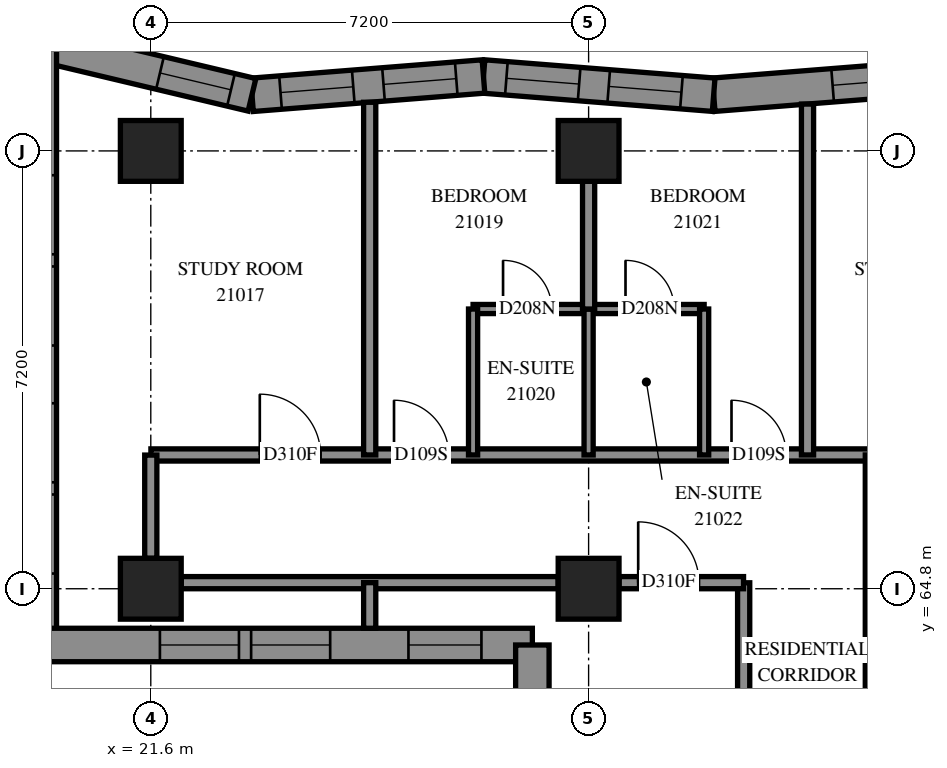
"""IFC4 building model, lengths in metres.
Left out: names, types, materials, properties, quantities, classifications, styles, units other than length and angle.
Written with IfcOpenShell. Run it as: python <this file> out.ifc"""

import sys

from ifc_helpers import new_model, si_unit, direction, frame, frame_2d, origin, origin_2d, place, context, subcontext, project, spatial, polyline, rectangle, outline, extrude, element, fill, save


model = new_model("IFC4")
c1 = context("Model", 3, precision=1e-05, world=origin(), true_north=direction((0.0, 1.0)))
c2 = subcontext(c1, "Body", "Model", "MODEL_VIEW")
j1 = project(units=[si_unit("LENGTHUNIT", "METRE"), si_unit("PLANEANGLEUNIT", "RADIAN")], contexts=[c1])
p1 = place(None, origin())
s1 = spatial("IfcSite", under=j1, at=p1, CompositionType="ELEMENT")
p2 = place(p1, origin())
s2 = spatial("IfcBuilding", under=s1, at=p2, CompositionType="ELEMENT")
p3 = place(p2, frame((0.0, 0.0, 81.2)))
s3 = spatial("IfcBuildingStorey", under=s2, at=p3, CompositionType="ELEMENT", Elevation=81.2)
for number, where, z_axis, x_axis in (
    (1, (21.6, 64.8, 0.0), (0.0, 0.0, 1.0), (1.0, 0.0, 0.0)),
    (2, (21.6, 72.0, 0.0), (0.0, 0.0, 1.0), (1.0, 0.0, 0.0)),
    (3, (28.8, 64.8, 0.0), (0.0, 0.0, 1.0), (1.0, 0.0, 0.0)),
    (4, (28.8, 72.0, 0.0), (0.0, 0.0, 1.0), (1.0, 0.0, 0.0)),
):
    element("IfcColumn", number, at=place(p3, frame(where, z_axis=z_axis, x_axis=x_axis)), inside=s3, PredefinedType="COLUMN", context=c2, shape_type="SweptSolid", body=[
        extrude(rectangle(XDim=1.0, YDim=1.0, at=origin_2d()), origin(), (0.0, 0.0, 1.0), 3.1),
    ])
p4 = place(p3, frame((34.642, 73.224, 0.0), z_axis=(0.0, 0.0, 1.0), x_axis=(-0.9968746163, -0.078999996, 0.0)))
e5 = element("IfcWall", 5, at=p4, inside=s3, PredefinedType="SOLIDWALL", context=c2, shape_type="SweptSolid", body=[
    extrude(outline(polyline([(-0.022, -0.275), (3.776, -0.275), (3.819, 0.275), (0.022, 0.275), (-0.022, -0.275)])), origin(), (0.0, 0.0, 1.0), 3.1),
])
p5 = place(p4, frame((0.636, 0.0, 0.5)))
e6 = element("IfcOpeningElement", 6, at=p5, cuts=e5, PredefinedType="OPENING", context=c2, shape_type="SweptSolid", body=[
    extrude(rectangle(XDim=1.2, YDim=2.45, at=frame_2d((0.6, 1.225))), frame((0.0, 0.285, 0.0), z_axis=(0.0, -1.0, 0.0), x_axis=(1.0, 0.0, 0.0)), (0.0, 0.0, 1.0), 0.57),
])
p6 = place(p3, frame((30.857, 72.924, 0.0), z_axis=(0.0, 0.0, 1.0), x_axis=(-0.9968747806, 0.0789979222, 0.0)))
e7 = element("IfcWall", 7, at=p6, inside=s3, PredefinedType="SOLIDWALL", context=c2, shape_type="SweptSolid", body=[
    extrude(outline(polyline([(0.022, -0.275), (3.819, -0.275), (3.776, 0.275), (-0.022, 0.275), (0.022, -0.275)])), origin(), (0.0, 0.0, 1.0), 3.1),
])
p7 = place(p6, frame((0.532, 0.0, 0.5)))
e8 = element("IfcOpeningElement", 8, at=p7, cuts=e7, PredefinedType="OPENING", context=c2, shape_type="SweptSolid", body=[
    extrude(rectangle(XDim=1.2, YDim=2.45, at=frame_2d((0.6, 1.225))), frame((0.0, 0.285, 0.0), z_axis=(0.0, -1.0, 0.0), x_axis=(1.0, 0.0, 0.0)), (0.0, 0.0, 1.0), 0.57),
])
p8 = place(p6, frame((2.22, 0.0, 0.5)))
e9 = element("IfcOpeningElement", 9, at=p8, cuts=e7, PredefinedType="OPENING", context=c2, shape_type="SweptSolid", body=[
    extrude(rectangle(XDim=1.2, YDim=2.45, at=frame_2d((0.6, 1.225))), frame((0.0, 0.285, 0.0), z_axis=(0.0, -1.0, 0.0), x_axis=(1.0, 0.0, 0.0)), (0.0, 0.0, 1.0), 0.57),
])
p9 = place(p3, frame((27.071, 73.224, 0.0), z_axis=(0.0, 0.0, 1.0), x_axis=(-0.9968745318, -0.0790010628, 0.0)))
e10 = element("IfcWall", 10, at=p9, inside=s3, PredefinedType="SOLIDWALL", context=c2, shape_type="SweptSolid", body=[
    extrude(outline(polyline([(-0.022, -0.275), (3.776, -0.275), (3.862, 0.275), (0.022, 0.275), (-0.022, -0.275)])), origin(), (0.0, 0.0, 1.0), 3.1),
])
p10 = place(p9, frame((0.449, 0.0, 0.5)))
e11 = element("IfcOpeningElement", 11, at=p10, cuts=e10, PredefinedType="OPENING", context=c2, shape_type="SweptSolid", body=[
    extrude(rectangle(XDim=1.2, YDim=2.45, at=frame_2d((0.6, 1.225))), frame((0.0, 0.285, 0.0), z_axis=(0.0, -1.0, 0.0), x_axis=(1.0, 0.0, 0.0)), (0.0, 0.0, 1.0), 0.57),
])
p11 = place(p9, frame((2.148, 0.0, 0.5)))
e12 = element("IfcOpeningElement", 12, at=p11, cuts=e10, PredefinedType="OPENING", context=c2, shape_type="SweptSolid", body=[
    extrude(rectangle(XDim=1.2, YDim=2.45, at=frame_2d((0.6, 1.225))), frame((0.0, 0.285, 0.0), z_axis=(0.0, -1.0, 0.0), x_axis=(1.0, 0.0, 0.0)), (0.0, 0.0, 1.0), 0.57),
])
p12 = place(p3, frame((23.264, 72.922, 0.0), z_axis=(0.0, 0.0, 1.0), x_axis=(-0.9728791637, 0.231313927, 0.0)))
e13 = element("IfcWall", 13, at=p12, inside=s3, PredefinedType="SOLIDWALL", context=c2, shape_type="SweptSolid", body=[
    extrude(outline(polyline([(0.043, -0.275), (3.934, -0.275), (3.238, 0.275), (-0.043, 0.275), (0.043, -0.275)])), origin(), (0.0, 0.0, 1.0), 3.1),
])
p13 = place(p12, frame((0.355, 0.0, 0.5)))
e14 = element("IfcOpeningElement", 14, at=p13, cuts=e13, PredefinedType="OPENING", context=c2, shape_type="SweptSolid", body=[
    extrude(rectangle(XDim=1.2, YDim=2.45, at=frame_2d((0.6, 1.225))), frame((0.0, 0.285, 0.0), z_axis=(0.0, -1.0, 0.0), x_axis=(1.0, 0.0, 0.0)), (0.0, 0.0, 1.0), 0.57),
])
p14 = place(p3, frame((19.775, 73.752, 0.0), z_axis=(0.0, 0.0, 1.0), x_axis=(0.0, -1.0, 0.0)))
e15 = element("IfcWall", 15, at=p14, inside=s3, PredefinedType="SOLIDWALL", context=c2, shape_type="SweptSolid", body=[
    extrude(outline(polyline([(-0.348, -0.275), (10.152, -0.275), (9.602, 0.275), (0.348, 0.275), (-0.348, -0.275)])), origin(), (0.0, 0.0, 1.0), 3.1),
])
p15 = place(p14, frame((2.152, 0.0, 0.5)))
e16 = element("IfcOpeningElement", 16, at=p15, cuts=e15, PredefinedType="OPENING", context=c2, shape_type="SweptSolid", body=[
    extrude(rectangle(XDim=1.3, YDim=2.45, at=frame_2d((0.65, 1.225))), frame((0.0, 0.285, 0.0), z_axis=(0.0, -1.0, 0.0), x_axis=(1.0, 0.0, 0.0)), (0.0, 0.0, 1.0), 0.57),
])
p16 = place(p14, frame((3.652, 0.0, 0.5)))
e17 = element("IfcOpeningElement", 17, at=p16, cuts=e15, PredefinedType="OPENING", context=c2, shape_type="SweptSolid", body=[
    extrude(rectangle(XDim=1.3, YDim=2.45, at=frame_2d((0.65, 1.225))), frame((0.0, 0.285, 0.0), z_axis=(0.0, -1.0, 0.0), x_axis=(1.0, 0.0, 0.0)), (0.0, 0.0, 1.0), 0.57),
])
p17 = place(p14, frame((5.902, 0.0, 0.5)))
e18 = element("IfcOpeningElement", 18, at=p17, cuts=e15, PredefinedType="OPENING", context=c2, shape_type="SweptSolid", body=[
    extrude(rectangle(XDim=1.3, YDim=2.45, at=frame_2d((0.65, 1.225))), frame((0.0, 0.285, 0.0), z_axis=(0.0, -1.0, 0.0), x_axis=(1.0, 0.0, 0.0)), (0.0, 0.0, 1.0), 0.57),
])
p18 = place(p14, frame((7.402, 0.0, 0.5)))
e19 = element("IfcOpeningElement", 19, at=p18, cuts=e15, PredefinedType="OPENING", context=c2, shape_type="SweptSolid", body=[
    extrude(rectangle(XDim=1.3, YDim=2.45, at=frame_2d((0.65, 1.225))), frame((0.0, 0.285, 0.0), z_axis=(0.0, -1.0, 0.0), x_axis=(1.0, 0.0, 0.0)), (0.0, 0.0, 1.0), 0.57),
])
p19 = place(p3, frame((19.775, 63.875, 0.0), z_axis=(0.0, 0.0, 1.0), x_axis=(1.0, 0.0, 0.0)))
e20 = element("IfcWall", 20, at=p19, inside=s3, PredefinedType="SOLIDWALL", context=c2, shape_type="SweptSolid", body=[
    extrude(outline(polyline([(-0.275, -0.275), (7.825, -0.275), (8.375, 0.275), (0.275, 0.275), (-0.275, -0.275)])), origin(), (0.0, 0.0, 1.0), 3.1),
])
p20 = place(p19, frame((1.975, 0.0, 0.5)))
e21 = element("IfcOpeningElement", 21, at=p20, cuts=e20, PredefinedType="OPENING", context=c2, shape_type="SweptSolid", body=[
    extrude(rectangle(XDim=1.3, YDim=2.45, at=frame_2d((0.65, 1.225))), frame((0.0, 0.285, 0.0), z_axis=(0.0, -1.0, 0.0), x_axis=(1.0, 0.0, 0.0)), (0.0, 0.0, 1.0), 0.57),
])
p21 = place(p19, frame((3.475, 0.0, 0.5)))
e22 = element("IfcOpeningElement", 22, at=p21, cuts=e20, PredefinedType="OPENING", context=c2, shape_type="SweptSolid", body=[
    extrude(rectangle(XDim=1.3, YDim=2.45, at=frame_2d((0.65, 1.225))), frame((0.0, 0.285, 0.0), z_axis=(0.0, -1.0, 0.0), x_axis=(1.0, 0.0, 0.0)), (0.0, 0.0, 1.0), 0.57),
])
p22 = place(p19, frame((6.062, 0.0, 0.5)))
e23 = element("IfcOpeningElement", 23, at=p22, cuts=e20, PredefinedType="OPENING", context=c2, shape_type="SweptSolid", body=[
    extrude(rectangle(XDim=1.2, YDim=2.45, at=frame_2d((0.6, 1.225))), frame((0.0, 0.285, 0.0), z_axis=(0.0, -1.0, 0.0), x_axis=(1.0, 0.0, 0.0)), (0.0, 0.0, 1.0), 0.57),
])
p23 = place(p3, frame((27.875, 63.875, 0.0), z_axis=(0.0, 0.0, 1.0), x_axis=(0.0, -1.0, 0.0)))
e24 = element("IfcWall", 24, at=p23, inside=s3, PredefinedType="SOLIDWALL", context=c2, shape_type="SweptSolid", body=[
    extrude(outline(polyline([(0.275, -0.275), (8.375, -0.275), (7.825, 0.275), (-0.275, 0.275), (0.275, -0.275)])), origin(), (0.0, 0.0, 1.0), 3.1),
])
p24 = place(p23, frame((4.825, 0.0, 0.5)))
e25 = element("IfcOpeningElement", 25, at=p24, cuts=e24, PredefinedType="OPENING", context=c2, shape_type="SweptSolid", body=[
    extrude(rectangle(XDim=1.3, YDim=2.45, at=frame_2d((0.65, 1.225))), frame((0.0, 0.285, 0.0), z_axis=(0.0, -1.0, 0.0), x_axis=(1.0, 0.0, 0.0)), (0.0, 0.0, 1.0), 0.57),
])
p25 = place(p23, frame((1.738, 0.0, 0.5)))
e26 = element("IfcOpeningElement", 26, at=p25, cuts=e24, PredefinedType="OPENING", context=c2, shape_type="SweptSolid", body=[
    extrude(rectangle(XDim=1.2, YDim=2.45, at=frame_2d((0.6, 1.225))), frame((0.0, 0.285, 0.0), z_axis=(0.0, -1.0, 0.0), x_axis=(1.0, 0.0, 0.0)), (0.0, 0.0, 1.0), 0.57),
])
p26 = place(p23, frame((3.9, 0.0, 0.45)))
e27 = element("IfcOpeningElement", 27, at=p26, cuts=e24, PredefinedType="OPENING", context=c2, shape_type="SweptSolid", body=[
    extrude(rectangle(XDim=0.8, YDim=2.5, at=frame_2d((0.4, 1.25))), frame((0.0, 0.285, 0.0), z_axis=(0.0, -1.0, 0.0), x_axis=(1.0, 0.0, 0.0)), (0.0, 0.0, 1.0), 0.57),
])
p27 = place(p3, frame((21.602, 67.0, 0.0), z_axis=(0.0, 0.0, 1.0), x_axis=(1.0, 0.0, 0.0)))
e28 = element("IfcWall", 28, at=p27, inside=s3, PredefinedType="PARTITIONING", context=c2, shape_type="SweptSolid", body=[
    extrude(rectangle(XDim=11.848, YDim=0.2, at=frame_2d((5.924, 0.0))), origin(), (0.0, 0.0, 1.0), 3.1),
])
p28 = place(p27, frame((1.791, 0.0, 0.0)))
e29 = element("IfcOpeningElement", 29, at=p28, cuts=e28, PredefinedType="OPENING", context=c2, shape_type="SweptSolid", body=[
    extrude(rectangle(XDim=1.0, YDim=2.1, at=frame_2d((0.5, 1.05))), frame((0.0, 0.11, 0.0), z_axis=(0.0, -1.0, 0.0), x_axis=(1.0, 0.0, 0.0)), (0.0, 0.0, 1.0), 0.22),
])
p29 = place(p27, frame((3.998, 0.0, 0.0)))
e30 = element("IfcOpeningElement", 30, at=p29, cuts=e28, PredefinedType="OPENING", context=c2, shape_type="SweptSolid", body=[
    extrude(rectangle(XDim=0.9, YDim=2.1, at=frame_2d((0.45, 1.05))), frame((0.0, 0.11, 0.0), z_axis=(0.0, -1.0, 0.0), x_axis=(1.0, 0.0, 0.0)), (0.0, 0.0, 1.0), 0.22),
])
p30 = place(p27, frame((9.548, 0.0, 0.0)))
e31 = element("IfcOpeningElement", 31, at=p30, cuts=e28, PredefinedType="OPENING", context=c2, shape_type="SweptSolid", body=[
    extrude(rectangle(XDim=0.9, YDim=2.1, at=frame_2d((0.45, 1.05))), frame((0.0, 0.11, 0.0), z_axis=(0.0, -1.0, 0.0), x_axis=(1.0, 0.0, 0.0)), (0.0, 0.0, 1.0), 0.22),
])
p31 = place(p3, frame((22.1, 64.9, 0.0), z_axis=(0.0, 0.0, 1.0), x_axis=(1.0, 0.0, 0.0)))
e32 = element("IfcWall", 32, at=p31, inside=s3, PredefinedType="PARTITIONING", context=c2, shape_type="SweptSolid", body=[
    extrude(rectangle(XDim=6.2, YDim=0.2, at=frame_2d((3.1, 0.0))), origin(), (0.0, 0.0, 1.0), 2.6),
])
p32 = place(p3, frame((25.2, 67.0, 0.0), z_axis=(0.0, 0.0, 1.0), x_axis=(0.0, 1.0, 0.0)))
e33 = element("IfcWall", 33, at=p32, inside=s3, PredefinedType="PARTITIONING", context=c2, shape_type="SweptSolid", body=[
    extrude(rectangle(XDim=5.8, YDim=0.2, at=frame_2d((2.9, 0.0))), origin(), (0.0, 0.0, 1.0), 3.1),
])
p33 = place(p3, frame((32.4, 67.0, 0.0), z_axis=(0.0, 0.0, 1.0), x_axis=(0.0, 1.0, 0.0)))
e34 = element("IfcWall", 34, at=p33, inside=s3, PredefinedType="PARTITIONING", context=c2, shape_type="SweptSolid", body=[
    extrude(rectangle(XDim=5.771, YDim=0.2, at=frame_2d((2.885, 0.0))), origin(), (0.0, 0.0, 1.0), 3.1),
])
p34 = place(p3, frame((33.45, 62.252, 0.0), z_axis=(0.0, 0.0, 1.0), x_axis=(0.0, 1.0, 0.0)))
e35 = element("IfcWall", 35, at=p34, inside=s3, PredefinedType="PARTITIONING", context=c2, shape_type="SweptSolid", body=[
    extrude(rectangle(XDim=4.748, YDim=0.2, at=frame_2d((2.374, 0.0))), origin(), (0.0, 0.0, 1.0), 3.1),
])
p35 = place(p3, frame((26.9, 69.4, 0.0), z_axis=(0.0, 0.0, 1.0), x_axis=(1.0, 0.0, 0.0)))
e36 = element("IfcWall", 36, at=p35, inside=s3, PredefinedType="PARTITIONING", context=c2, shape_type="SweptSolid", body=[
    extrude(rectangle(XDim=3.8, YDim=0.15, at=frame_2d((1.9, 0.0))), origin(), (0.0, 0.0, 1.0), 3.1),
])
p36 = place(p35, frame((0.493, 0.0, 0.0)))
e37 = element("IfcOpeningElement", 37, at=p36, cuts=e36, PredefinedType="OPENING", context=c2, shape_type="SweptSolid", body=[
    extrude(rectangle(XDim=0.8, YDim=2.1, at=frame_2d((0.4, 1.05))), frame((0.0, 0.085, 0.0), z_axis=(0.0, -1.0, 0.0), x_axis=(1.0, 0.0, 0.0)), (0.0, 0.0, 1.0), 0.17),
])
p37 = place(p35, frame((2.507, 0.0, 0.0)))
e38 = element("IfcOpeningElement", 38, at=p37, cuts=e36, PredefinedType="OPENING", context=c2, shape_type="SweptSolid", body=[
    extrude(rectangle(XDim=0.8, YDim=2.1, at=frame_2d((0.4, 1.05))), frame((0.0, 0.085, 0.0), z_axis=(0.0, -1.0, 0.0), x_axis=(1.0, 0.0, 0.0)), (0.0, 0.0, 1.0), 0.17),
])
p38 = place(p3, frame((31.35, 62.252, 0.0), z_axis=(0.0, 0.0, 1.0), x_axis=(0.0, 1.0, 0.0)))
e39 = element("IfcWall", 39, at=p38, inside=s3, PredefinedType="PARTITIONING", context=c2, shape_type="SweptSolid", body=[
    extrude(rectangle(XDim=2.646, YDim=0.2, at=frame_2d((1.323, 0.0))), origin(), (0.0, 0.0, 1.0), 3.1),
])
for number, where, z_axis, x_axis in (
    (40, (26.9, 67.0, 0.0), (0.0, 0.0, 1.0), (0.0, 1.0, 0.0)),
    (41, (28.8, 67.0, 0.0), (0.0, 0.0, 1.0), (0.0, 1.0, 0.0)),
    (42, (30.7, 67.0, 0.0), (0.0, 0.0, 1.0), (0.0, 1.0, 0.0)),
):
    element("IfcWall", number, at=place(p3, frame(where, z_axis=z_axis, x_axis=x_axis)), inside=s3, PredefinedType="PARTITIONING", context=c2, shape_type="SweptSolid", body=[
        extrude(rectangle(XDim=2.4, YDim=0.15, at=frame_2d((1.2, 0.0))), origin(), (0.0, 0.0, 1.0), 3.1),
    ])
p39 = place(p3, frame((28.8, 69.4, 0.0), z_axis=(0.0, 0.0, 1.0), x_axis=(0.0, 1.0, 0.0)))
e43 = element("IfcWall", 43, at=p39, inside=s3, PredefinedType="PARTITIONING", context=c2, shape_type="SweptSolid", body=[
    extrude(rectangle(XDim=2.1, YDim=0.2, at=frame_2d((1.05, 0.0))), origin(), (0.0, 0.0, 1.0), 3.1),
])
p40 = place(p3, frame((29.3, 64.9, 0.0), z_axis=(0.0, 0.0, 1.0), x_axis=(1.0, 0.0, 0.0)))
e44 = element("IfcWall", 44, at=p40, inside=s3, PredefinedType="PARTITIONING", context=c2, shape_type="SweptSolid", body=[
    extrude(rectangle(XDim=2.048, YDim=0.2, at=frame_2d((1.024, 0.0))), origin(), (0.0, 0.0, 1.0), 3.1),
])
p41 = place(p40, frame((0.316, 0.0, 0.0)))
e45 = element("IfcOpeningElement", 45, at=p41, cuts=e44, PredefinedType="OPENING", context=c2, shape_type="SweptSolid", body=[
    extrude(rectangle(XDim=1.0, YDim=2.1, at=frame_2d((0.5, 1.05))), frame((0.0, 0.11, 0.0), z_axis=(0.0, -1.0, 0.0), x_axis=(1.0, 0.0, 0.0)), (0.0, 0.0, 1.0), 0.22),
])
p42 = place(p3, frame((21.6, 65.3, 0.0), z_axis=(0.0, 0.0, 1.0), x_axis=(0.0, 1.0, 0.0)))
e46 = element("IfcWall", 46, at=p42, inside=s3, PredefinedType="PARTITIONING", context=c2, shape_type="SweptSolid", body=[
    extrude(rectangle(XDim=1.698, YDim=0.2, at=frame_2d((0.849, 0.0))), origin(), (0.0, 0.0, 1.0), 2.6),
])
p43 = place(p3, frame((25.2, 64.15, 0.0), z_axis=(0.0, 0.0, 1.0), x_axis=(0.0, 1.0, 0.0)))
e47 = element("IfcWall", 47, at=p43, inside=s3, PredefinedType="PARTITIONING", context=c2, shape_type="SweptSolid", body=[
    extrude(rectangle(XDim=0.75, YDim=0.2, at=frame_2d((0.375, 0.0))), origin(), (0.0, 0.0, 1.0), 3.1),
])
p44 = place(p5, origin())
e48 = element("IfcWindow", 48, at=p44, inside=s3, PartitioningType="SINGLE_PANEL", PredefinedType="WINDOW", context=c2, shape_type="SweptSolid", body=[
    extrude(rectangle(XDim=1.2, YDim=2.45, at=frame_2d((0.6, 1.225))), frame((0.0, 0.155, 0.0), z_axis=(0.0, -1.0, 0.0), x_axis=(1.0, 0.0, 0.0)), (0.0, 0.0, 1.0), 0.06),
])
fill(e6, e48)
p45 = place(p7, origin())
e49 = element("IfcWindow", 49, at=p45, inside=s3, PartitioningType="SINGLE_PANEL", PredefinedType="WINDOW", context=c2, shape_type="SweptSolid", body=[
    extrude(rectangle(XDim=1.2, YDim=2.45, at=frame_2d((0.6, 1.225))), frame((0.0, 0.155, 0.0), z_axis=(0.0, -1.0, 0.0), x_axis=(1.0, 0.0, 0.0)), (0.0, 0.0, 1.0), 0.06),
])
fill(e8, e49)
p46 = place(p8, origin())
e50 = element("IfcWindow", 50, at=p46, inside=s3, PartitioningType="SINGLE_PANEL", PredefinedType="WINDOW", context=c2, shape_type="SweptSolid", body=[
    extrude(rectangle(XDim=1.2, YDim=2.45, at=frame_2d((0.6, 1.225))), frame((0.0, 0.155, 0.0), z_axis=(0.0, -1.0, 0.0), x_axis=(1.0, 0.0, 0.0)), (0.0, 0.0, 1.0), 0.06),
])
fill(e9, e50)
p47 = place(p10, origin())
e51 = element("IfcWindow", 51, at=p47, inside=s3, PartitioningType="SINGLE_PANEL", PredefinedType="WINDOW", context=c2, shape_type="SweptSolid", body=[
    extrude(rectangle(XDim=1.2, YDim=2.45, at=frame_2d((0.6, 1.225))), frame((0.0, 0.155, 0.0), z_axis=(0.0, -1.0, 0.0), x_axis=(1.0, 0.0, 0.0)), (0.0, 0.0, 1.0), 0.06),
])
fill(e11, e51)
p48 = place(p11, origin())
e52 = element("IfcWindow", 52, at=p48, inside=s3, PartitioningType="SINGLE_PANEL", PredefinedType="WINDOW", context=c2, shape_type="SweptSolid", body=[
    extrude(rectangle(XDim=1.2, YDim=2.45, at=frame_2d((0.6, 1.225))), frame((0.0, 0.155, 0.0), z_axis=(0.0, -1.0, 0.0), x_axis=(1.0, 0.0, 0.0)), (0.0, 0.0, 1.0), 0.06),
])
fill(e12, e52)
p49 = place(p13, origin())
e53 = element("IfcWindow", 53, at=p49, inside=s3, PartitioningType="SINGLE_PANEL", PredefinedType="WINDOW", context=c2, shape_type="SweptSolid", body=[
    extrude(rectangle(XDim=1.2, YDim=2.45, at=frame_2d((0.6, 1.225))), frame((0.0, 0.155, 0.0), z_axis=(0.0, -1.0, 0.0), x_axis=(1.0, 0.0, 0.0)), (0.0, 0.0, 1.0), 0.06),
])
fill(e14, e53)
p50 = place(p20, origin())
e54 = element("IfcWindow", 54, at=p50, inside=s3, PartitioningType="SINGLE_PANEL", PredefinedType="WINDOW", context=c2, shape_type="SweptSolid", body=[
    extrude(rectangle(XDim=1.3, YDim=2.45, at=frame_2d((0.65, 1.225))), frame((0.0, 0.155, 0.0), z_axis=(0.0, -1.0, 0.0), x_axis=(1.0, 0.0, 0.0)), (0.0, 0.0, 1.0), 0.06),
])
fill(e21, e54)
p51 = place(p21, origin())
e55 = element("IfcWindow", 55, at=p51, inside=s3, PartitioningType="SINGLE_PANEL", PredefinedType="WINDOW", context=c2, shape_type="SweptSolid", body=[
    extrude(rectangle(XDim=1.3, YDim=2.45, at=frame_2d((0.65, 1.225))), frame((0.0, 0.155, 0.0), z_axis=(0.0, -1.0, 0.0), x_axis=(1.0, 0.0, 0.0)), (0.0, 0.0, 1.0), 0.06),
])
fill(e22, e55)
p52 = place(p22, origin())
e56 = element("IfcWindow", 56, at=p52, inside=s3, PartitioningType="SINGLE_PANEL", PredefinedType="WINDOW", context=c2, shape_type="SweptSolid", body=[
    extrude(rectangle(XDim=1.2, YDim=2.45, at=frame_2d((0.6, 1.225))), frame((0.0, 0.155, 0.0), z_axis=(0.0, -1.0, 0.0), x_axis=(1.0, 0.0, 0.0)), (0.0, 0.0, 1.0), 0.06),
])
fill(e23, e56)
p53 = place(p28, origin())
e57 = element("IfcDoor", 57, at=p53, inside=s3, OperationType="SINGLE_SWING_RIGHT", PredefinedType="DOOR", context=c2, shape_type="SweptSolid", body=[
    extrude(rectangle(XDim=1.0, YDim=2.1, at=frame_2d((0.5, 1.05))), frame((0.0, 0.025, 0.0), z_axis=(0.0, -1.0, 0.0), x_axis=(1.0, 0.0, 0.0)), (0.0, 0.0, 1.0), 0.05),
])
fill(e29, e57)
p54 = place(p41, origin())
e58 = element("IfcDoor", 58, at=p54, inside=s3, OperationType="SINGLE_SWING_RIGHT", PredefinedType="DOOR", context=c2, shape_type="SweptSolid", body=[
    extrude(rectangle(XDim=1.0, YDim=2.1, at=frame_2d((0.5, 1.05))), frame((0.0, 0.025, 0.0), z_axis=(0.0, -1.0, 0.0), x_axis=(1.0, 0.0, 0.0)), (0.0, 0.0, 1.0), 0.05),
])
fill(e45, e58)
p55 = place(p29, origin())
e59 = element("IfcDoor", 59, at=p55, inside=s3, OperationType="SINGLE_SWING_LEFT", PredefinedType="DOOR", context=c2, shape_type="SweptSolid", body=[
    extrude(rectangle(XDim=0.9, YDim=2.1, at=frame_2d((0.45, 1.05))), frame((0.0, 0.025, 0.0), z_axis=(0.0, -1.0, 0.0), x_axis=(1.0, 0.0, 0.0)), (0.0, 0.0, 1.0), 0.05),
])
fill(e30, e59)
p56 = place(p36, origin())
e60 = element("IfcDoor", 60, at=p56, inside=s3, OperationType="SINGLE_SWING_RIGHT", PredefinedType="DOOR", context=c2, shape_type="SweptSolid", body=[
    extrude(rectangle(XDim=0.8, YDim=2.1, at=frame_2d((0.4, 1.05))), frame((0.0, 0.025, 0.0), z_axis=(0.0, -1.0, 0.0), x_axis=(1.0, 0.0, 0.0)), (0.0, 0.0, 1.0), 0.05),
])
fill(e37, e60)
p57 = place(p30, origin())
e61 = element("IfcDoor", 61, at=p57, inside=s3, OperationType="SINGLE_SWING_RIGHT", PredefinedType="DOOR", context=c2, shape_type="SweptSolid", body=[
    extrude(rectangle(XDim=0.9, YDim=2.1, at=frame_2d((0.45, 1.05))), frame((0.0, 0.025, 0.0), z_axis=(0.0, -1.0, 0.0), x_axis=(1.0, 0.0, 0.0)), (0.0, 0.0, 1.0), 0.05),
])
fill(e31, e61)
p58 = place(p37, origin())
e62 = element("IfcDoor", 62, at=p58, inside=s3, OperationType="SINGLE_SWING_RIGHT", PredefinedType="DOOR", context=c2, shape_type="SweptSolid", body=[
    extrude(rectangle(XDim=0.8, YDim=2.1, at=frame_2d((0.4, 1.05))), frame((0.0, 0.025, 0.0), z_axis=(0.0, -1.0, 0.0), x_axis=(1.0, 0.0, 0.0)), (0.0, 0.0, 1.0), 0.05),
])
fill(e38, e62)
save(model, sys.argv[1])
